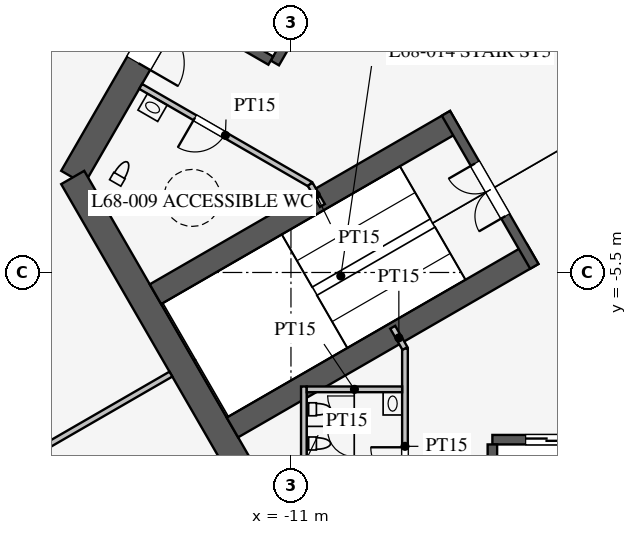
"""IFC4 building model, lengths in metres.
Left out: names, types, materials, properties, quantities, classifications, styles, units other than length and angle.
Written with IfcOpenShell. Run it as: python <this file> out.ifc"""

import sys

from ifc_helpers import new_model, si_unit, direction, frame, frame_2d, origin, place, context, subcontext, project, spatial, rectangle, extrude, element, fill, save


model = new_model("IFC4")
c1 = context("Model", 3, precision=1e-05, world=origin(), true_north=direction((0.0, 1.0)))
c2 = subcontext(c1, "Body", "Model", "MODEL_VIEW")
j1 = project(units=[si_unit("LENGTHUNIT", "METRE"), si_unit("PLANEANGLEUNIT", "RADIAN")], contexts=[c1])
p1 = place(None, origin())
s1 = spatial("IfcSite", under=j1, at=p1, CompositionType="ELEMENT")
p2 = place(p1, origin())
s2 = spatial("IfcBuilding", under=s1, at=p2, CompositionType="ELEMENT")
p3 = place(p2, frame((0.0, 0.0, 297.3)))
s3 = spatial("IfcBuildingStorey", under=s2, at=p3, CompositionType="ELEMENT", Elevation=297.3)
p4 = place(p3, frame((-5.773, 16.0, 0.0), z_axis=(0.0, 0.0, 1.0), x_axis=(-0.500002442456, -0.866023993627, 0.0)))
e1 = element("IfcWall", 1, at=p4, inside=s3, PredefinedType="SHEAR", context=c2, shape_type="SweptSolid", body=[
    extrude(rectangle(XDim=21.939, YDim=0.7, at=frame_2d((10.97, 0.0))), origin(), (0.0, 0.0, 1.0), 4.2),
])
p5 = place(p4, frame((17.27, 0.0, 0.0)))
e2 = element("IfcOpeningElement", 2, at=p5, cuts=e1, PredefinedType="OPENING", context=c2, shape_type="SweptSolid", body=[
    extrude(rectangle(XDim=1.2, YDim=2.1, at=frame_2d((0.6, 1.05))), frame((0.0, 0.36, 0.0), z_axis=(0.0, -1.0, 0.0), x_axis=(1.0, 0.0, 0.0)), (0.0, 0.0, 1.0), 0.72),
])
p6 = place(p4, frame((3.47, 0.0, 0.0)))
e3 = element("IfcOpeningElement", 3, at=p6, cuts=e1, PredefinedType="OPENING", context=c2, shape_type="SweptSolid", body=[
    extrude(rectangle(XDim=1.2, YDim=2.1, at=frame_2d((0.6, 1.05))), frame((0.0, 0.36, 0.0), z_axis=(0.0, -1.0, 0.0), x_axis=(1.0, 0.0, 0.0)), (0.0, 0.0, 1.0), 0.72),
])
p7 = place(p3, frame((-16.743, -3.0, 0.0), z_axis=(0.0, 0.0, 1.0), x_axis=(0.499995765644, -0.866027848477, 0.0)))
e4 = element("IfcWall", 4, at=p7, inside=s3, PredefinedType="SHEAR", context=c2, shape_type="SweptSolid", body=[
    extrude(rectangle(XDim=11.547, YDim=0.7, at=frame_2d((5.773, 0.0))), origin(), (0.0, 0.0, 1.0), 4.2),
])
p8 = place(p3, frame((-5.7, -9.9, 0.0), z_axis=(0.0, 0.0, 1.0), x_axis=(1.0, 0.0, 0.0)))
e5 = element("IfcWall", 5, at=p8, inside=s3, PredefinedType="SHEAR", context=c2, shape_type="SweptSolid", body=[
    extrude(rectangle(XDim=11.4, YDim=0.25, at=frame_2d((5.7, 0.0))), origin(), (0.0, 0.0, 1.0), 4.2),
])
p9 = place(p8, frame((0.875, 0.0, 0.0)))
e6 = element("IfcOpeningElement", 6, at=p9, cuts=e5, PredefinedType="OPENING", context=c2, shape_type="SweptSolid", body=[
    extrude(rectangle(XDim=1.1, YDim=2.2, at=frame_2d((0.55, 1.1))), frame((0.0, 0.135, 0.0), z_axis=(0.0, -1.0, 0.0), x_axis=(1.0, 0.0, 0.0)), (0.0, 0.0, 1.0), 0.27),
])
p10 = place(p8, frame((3.725, 0.0, 0.0)))
e7 = element("IfcOpeningElement", 7, at=p10, cuts=e5, PredefinedType="OPENING", context=c2, shape_type="SweptSolid", body=[
    extrude(rectangle(XDim=1.1, YDim=2.2, at=frame_2d((0.55, 1.1))), frame((0.0, 0.135, 0.0), z_axis=(0.0, -1.0, 0.0), x_axis=(1.0, 0.0, 0.0)), (0.0, 0.0, 1.0), 0.27),
])
p11 = place(p8, frame((6.575, 0.0, 0.0)))
e8 = element("IfcOpeningElement", 8, at=p11, cuts=e5, PredefinedType="OPENING", context=c2, shape_type="SweptSolid", body=[
    extrude(rectangle(XDim=1.1, YDim=2.2, at=frame_2d((0.55, 1.1))), frame((0.0, 0.135, 0.0), z_axis=(0.0, -1.0, 0.0), x_axis=(1.0, 0.0, 0.0)), (0.0, 0.0, 1.0), 0.27),
])
p12 = place(p8, frame((9.425, 0.0, 0.0)))
e9 = element("IfcOpeningElement", 9, at=p12, cuts=e5, PredefinedType="OPENING", context=c2, shape_type="SweptSolid", body=[
    extrude(rectangle(XDim=1.1, YDim=2.2, at=frame_2d((0.55, 1.1))), frame((0.0, 0.135, 0.0), z_axis=(0.0, -1.0, 0.0), x_axis=(1.0, 0.0, 0.0)), (0.0, 0.0, 1.0), 0.27),
])
p13 = place(p3, frame((-5.7, -10.025, 0.0), z_axis=(0.0, 0.0, 1.0), x_axis=(0.0, -1.0, 0.0)))
e10 = element("IfcWall", 10, at=p13, inside=s3, PredefinedType="SHEAR", context=c2, shape_type="SweptSolid", body=[
    extrude(rectangle(XDim=2.625, YDim=0.25, at=frame_2d((1.312, 0.0))), origin(), (0.0, 0.0, 1.0), 4.2),
])
p14 = place(p3, frame((-5.724, 9.886, 0.0), z_axis=(0.0, 0.0, 1.0), x_axis=(-0.500001763848, -0.866024385424, 0.0)))
e11 = element("IfcWall", 11, at=p14, inside=s3, PredefinedType="SHEAR", context=c2, shape_type="SweptSolid", body=[
    extrude(rectangle(XDim=11.4, YDim=0.25, at=frame_2d((5.7, 0.0))), origin(), (0.0, 0.0, 1.0), 4.2),
])
p15 = place(p14, frame((6.525, 0.0, 0.0)))
e12 = element("IfcOpeningElement", 12, at=p15, cuts=e11, PredefinedType="OPENING", context=c2, shape_type="SweptSolid", body=[
    extrude(rectangle(XDim=1.2, YDim=2.2, at=frame_2d((0.6, 1.1))), frame((0.0, 0.135, 0.0), z_axis=(0.0, -1.0, 0.0), x_axis=(1.0, 0.0, 0.0)), (0.0, 0.0, 1.0), 0.27),
])
p16 = place(p14, frame((9.375, 0.0, 0.0)))
e13 = element("IfcOpeningElement", 13, at=p16, cuts=e11, PredefinedType="OPENING", context=c2, shape_type="SweptSolid", body=[
    extrude(rectangle(XDim=1.2, YDim=2.2, at=frame_2d((0.6, 1.1))), frame((0.0, 0.135, 0.0), z_axis=(0.0, -1.0, 0.0), x_axis=(1.0, 0.0, 0.0)), (0.0, 0.0, 1.0), 0.27),
])
p17 = place(p3, frame((-11.532, 0.076, 0.0), z_axis=(0.0, 0.0, 1.0), x_axis=(-0.866013657776, 0.500020344131, 0.0)))
e14 = element("IfcWall", 14, at=p17, inside=s3, PredefinedType="SHEAR", context=c2, shape_type="SweptSolid", body=[
    extrude(rectangle(XDim=2.625, YDim=0.25, at=frame_2d((1.312, 0.0))), origin(), (0.0, 0.0, 1.0), 4.2),
])
for number, where, z_axis, x_axis in (
    (15, (-6.663, -1.509, 0.0), (0.0, 0.0, 1.0), (-0.866, -0.5, 0.0)),
    (16, (-4.638, -5.016, 0.0), (0.0, 0.0, 1.0), (-0.866, -0.5, 0.0)),
):
    element("IfcWall", number, at=place(p3, frame(where, z_axis=z_axis, x_axis=x_axis)), inside=s3, PredefinedType="SHEAR", context=c2, shape_type="SweptSolid", body=[
        extrude(rectangle(XDim=9.125, YDim=0.6, at=frame_2d((4.562, 0.0))), origin(), (0.0, 0.0, 1.0), 4.2),
    ])
p18 = place(p3, frame((-6.922, -1.312, 0.0), z_axis=(0.0, 0.0, 1.0), x_axis=(0.499984536904, -0.866034331223, 0.0)))
e17 = element("IfcWall", 17, at=p18, inside=s3, PredefinedType="SHEAR", context=c2, shape_type="SweptSolid", body=[
    extrude(rectangle(XDim=4.65, YDim=0.25, at=frame_2d((2.325, 0.0))), origin(), (0.0, 0.0, 1.0), 4.2),
])
p19 = place(p18, frame((1.525, 0.0, 0.0)))
e18 = element("IfcOpeningElement", 18, at=p19, cuts=e17, PredefinedType="OPENING", context=c2, shape_type="SweptSolid", body=[
    extrude(rectangle(XDim=1.6, YDim=2.1, at=frame_2d((0.8, 1.05))), frame((0.0, 0.135, 0.0), z_axis=(0.0, -1.0, 0.0), x_axis=(1.0, 0.0, 0.0)), (0.0, 0.0, 1.0), 0.27),
])
p20 = place(p3, frame((-8.0, -7.5, 0.0), z_axis=(0.0, 0.0, 1.0), x_axis=(0.0, -1.0, 0.0)))
e19 = element("IfcWall", 19, at=p20, inside=s3, PredefinedType="PARTITIONING", context=c2, shape_type="SweptSolid", body=[
    extrude(rectangle(XDim=5.15, YDim=0.15, at=frame_2d((2.575, 0.0))), origin(), (0.0, 0.0, 1.0), 4.0),
])
p21 = place(p20, frame((2.6, 0.0, 0.0)))
e20 = element("IfcOpeningElement", 20, at=p21, cuts=e19, PredefinedType="OPENING", context=c2, shape_type="SweptSolid", body=[
    extrude(rectangle(XDim=0.9, YDim=2.1, at=frame_2d((0.45, 1.05))), frame((0.0, 0.085, 0.0), z_axis=(0.0, -1.0, 0.0), x_axis=(1.0, 0.0, 0.0)), (0.0, 0.0, 1.0), 0.17),
])
p22 = place(p3, frame((-10.495, -3.178, 0.0), z_axis=(0.0, 0.0, 1.0), x_axis=(-0.866037967349, 0.499978238636, 0.0)))
e21 = element("IfcWall", 21, at=p22, inside=s3, PredefinedType="PARTITIONING", context=c2, shape_type="SweptSolid", body=[
    extrude(rectangle(XDim=5.15, YDim=0.15, at=frame_2d((2.575, 0.0))), origin(), (0.0, 0.0, 1.0), 4.0),
])
p23 = place(p22, frame((2.6, 0.0, 0.0)))
e22 = element("IfcOpeningElement", 22, at=p23, cuts=e21, PredefinedType="OPENING", context=c2, shape_type="SweptSolid", body=[
    extrude(rectangle(XDim=0.9, YDim=2.1, at=frame_2d((0.45, 1.05))), frame((0.0, 0.085, 0.0), z_axis=(0.0, -1.0, 0.0), x_axis=(1.0, 0.0, 0.0)), (0.0, 0.0, 1.0), 0.17),
])
for number, where, z_axis, x_axis in (
    (23, (-10.495, -3.178, 0.0), (0.0, 0.0, 1.0), (0.5, -0.866, 0.0)),
    (24, (-8.0, -7.5, 0.0), (0.0, 0.0, 1.0), (-0.5, 0.866, 0.0)),
):
    element("IfcWall", number, at=place(p3, frame(where, z_axis=z_axis, x_axis=x_axis)), inside=s3, PredefinedType="PARTITIONING", context=c2, shape_type="SweptSolid", body=[
        extrude(rectangle(XDim=0.645, YDim=0.15, at=frame_2d((0.323, 0.0))), origin(), (0.0, 0.0, 1.0), 4.0),
    ])
p24 = place(p3, frame((-10.66, -8.5, 0.0), z_axis=(0.0, 0.0, 1.0), x_axis=(0.0, -1.0, 0.0)))
e25 = element("IfcWall", 25, at=p24, inside=s3, PredefinedType="PARTITIONING", context=c2, shape_type="SweptSolid", body=[
    extrude(rectangle(XDim=4.1, YDim=0.15, at=frame_2d((2.05, 0.0))), origin(), (0.0, 0.0, 1.0), 4.0),
])
p25 = place(p3, frame((-8.075, -8.575, 0.0), z_axis=(0.0, 0.0, 1.0), x_axis=(-1.0, 0.0, 0.0)))
e26 = element("IfcWall", 26, at=p25, inside=s3, PredefinedType="PARTITIONING", context=c2, shape_type="SweptSolid", body=[
    extrude(rectangle(XDim=2.51, YDim=0.15, at=frame_2d((1.255, 0.0))), origin(), (0.0, 0.0, 1.0), 4.0),
])
p26 = place(p3, frame((-14.159, -8.175, 0.0), z_axis=(0.0, 0.0, 1.0), x_axis=(-0.866026905467, -0.499997399001, 0.0)))
e27 = element("IfcWall", 27, at=p26, inside=s3, PredefinedType="PARTITIONING", context=c2, shape_type="SweptSolid", body=[
    extrude(rectangle(XDim=13.4, YDim=0.15, at=frame_2d((6.7, 0.0))), origin(), (0.0, 0.0, 1.0), 2.5),
])
p27 = place(p21, frame((0.9, 0.0, 0.0), z_axis=(0.0, 0.0, 1.0), x_axis=(-1.0, 0.0, 0.0)))
e28 = element("IfcDoor", 28, at=p27, inside=s3, OperationType="SINGLE_SWING_RIGHT", PredefinedType="DOOR", context=c2, shape_type="SweptSolid", body=[
    extrude(rectangle(XDim=0.9, YDim=2.1, at=frame_2d((0.45, 1.05))), frame((0.0, 0.025, 0.0), z_axis=(0.0, -1.0, 0.0), x_axis=(1.0, 0.0, 0.0)), (0.0, 0.0, 1.0), 0.05),
])
fill(e20, e28)
p28 = place(p23, origin())
e29 = element("IfcDoor", 29, at=p28, inside=s3, OperationType="SINGLE_SWING_RIGHT", PredefinedType="DOOR", context=c2, shape_type="SweptSolid", body=[
    extrude(rectangle(XDim=0.9, YDim=2.1, at=frame_2d((0.45, 1.05))), frame((0.0, 0.025, 0.0), z_axis=(0.0, -1.0, 0.0), x_axis=(1.0, 0.0, 0.0)), (0.0, 0.0, 1.0), 0.05),
])
fill(e22, e29)
p29 = place(p19, frame((1.6, 0.0, 0.0), z_axis=(0.0, 0.0, 1.0), x_axis=(-1.0, 0.0, 0.0)))
e30 = element("IfcDoor", 30, at=p29, inside=s3, OperationType="DOUBLE_DOOR_SINGLE_SWING", PredefinedType="DOOR", context=c2, shape_type="SweptSolid", body=[
    extrude(rectangle(XDim=1.6, YDim=2.1, at=frame_2d((0.8, 1.05))), frame((0.0, 0.025, 0.0), z_axis=(0.0, -1.0, 0.0), x_axis=(1.0, 0.0, 0.0)), (0.0, 0.0, 1.0), 0.05),
])
fill(e18, e30)
p30 = place(p5, origin())
e31 = element("IfcDoor", 31, at=p30, inside=s3, OperationType="SINGLE_SWING_RIGHT", PredefinedType="DOOR", context=c2, shape_type="SweptSolid", body=[
    extrude(rectangle(XDim=1.2, YDim=2.1, at=frame_2d((0.6, 1.05))), frame((0.0, 0.025, 0.0), z_axis=(0.0, -1.0, 0.0), x_axis=(1.0, 0.0, 0.0)), (0.0, 0.0, 1.0), 0.05),
])
fill(e2, e31)
p31 = place(p9, origin())
e32 = element("IfcDoor", 32, at=p31, inside=s3, OperationType="DOUBLE_DOOR_SLIDING", PredefinedType="DOOR", context=c2, shape_type="SweptSolid", body=[
    extrude(rectangle(XDim=1.1, YDim=2.2, at=frame_2d((0.55, 1.1))), frame((0.0, 0.025, 0.0), z_axis=(0.0, -1.0, 0.0), x_axis=(1.0, 0.0, 0.0)), (0.0, 0.0, 1.0), 0.05),
])
fill(e6, e32)
save(model, sys.argv[1])
